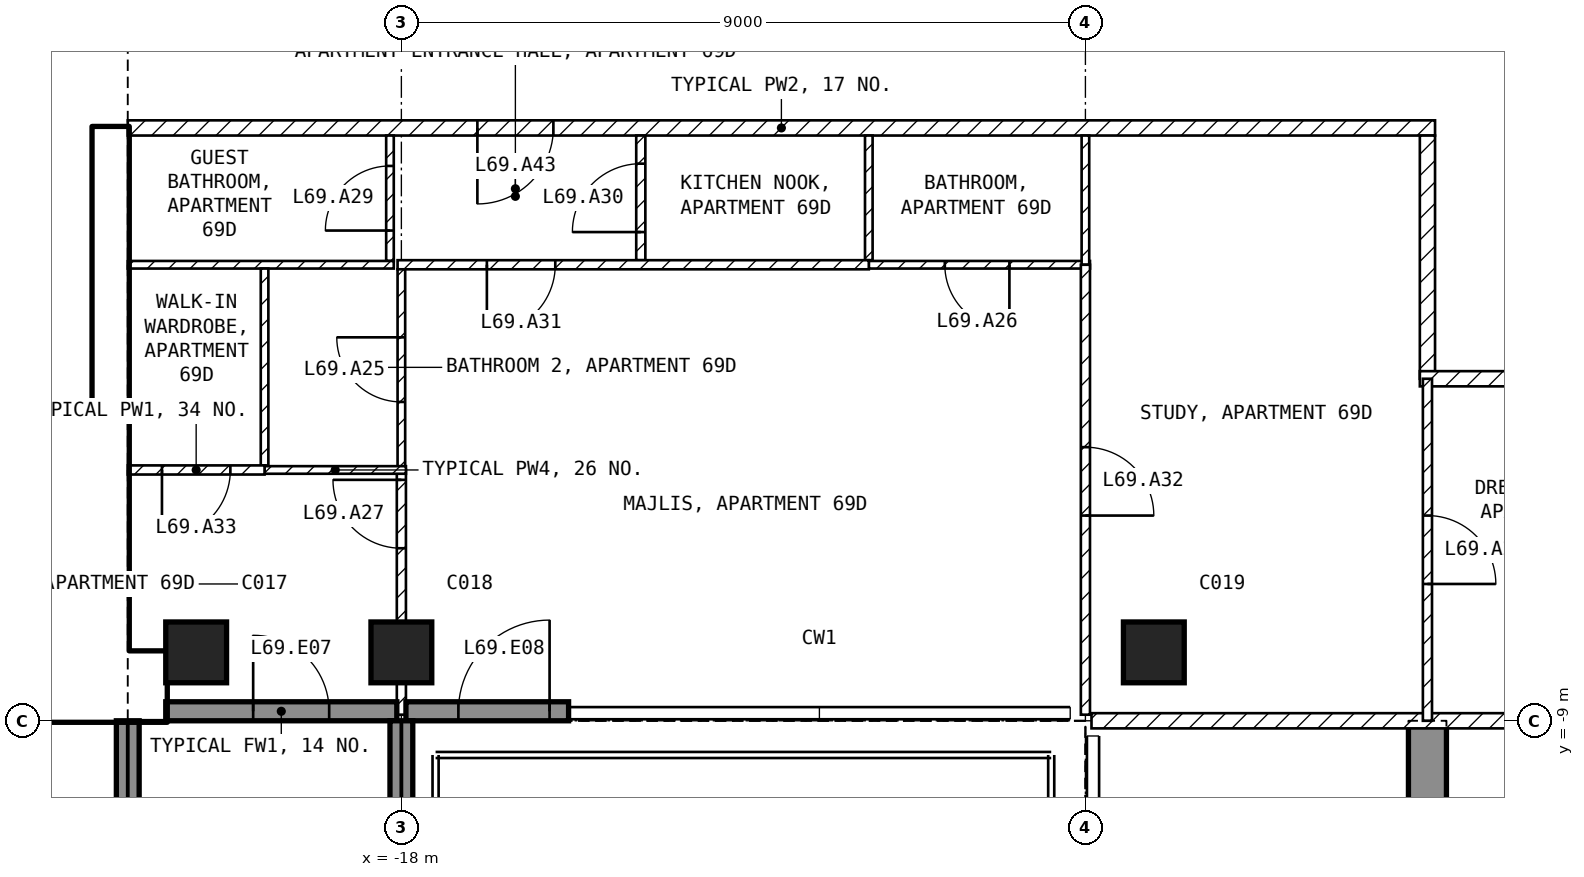
"""IFC4 building model, lengths in metres.
Left out: names, types, materials, properties, quantities, classifications, styles, units other than length and angle.
Written with IfcOpenShell. Run it as: python <this file> out.ifc"""

import sys

from ifc_helpers import new_model, si_unit, direction, frame, frame_2d, origin, origin_2d, place, context, subcontext, project, spatial, polyline, rectangle, outline, extrude, element, fill, save


model = new_model("IFC4")
c1 = context("Model", 3, precision=1e-05, world=origin(), true_north=direction((0.0, 1.0)))
c2 = subcontext(c1, "Body", "Model", "MODEL_VIEW")
j1 = project(units=[si_unit("LENGTHUNIT", "METRE"), si_unit("PLANEANGLEUNIT", "RADIAN")], contexts=[c1])
p1 = place(None, origin())
s1 = spatial("IfcSite", under=j1, at=p1, CompositionType="ELEMENT")
p2 = place(p1, origin())
s2 = spatial("IfcBuilding", under=s1, at=p2, CompositionType="ELEMENT")
p3 = place(p2, frame((0.0, 0.0, 271.0)))
s3 = spatial("IfcBuildingStorey", under=s2, at=p3, CompositionType="ELEMENT", Elevation=271.0)
for number, where, z_axis, x_axis in (
    (1, (-20.7, -8.1, -0.25), (0.0, 0.0, 1.0), (1.0, 0.0, 0.0)),
    (2, (-18.0, -8.1, -0.25), (0.0, 0.0, 1.0), (1.0, 0.0, 0.0)),
    (3, (-8.1, -8.1, -0.25), (0.0, 0.0, 1.0), (1.0, 0.0, 0.0)),
):
    element("IfcColumn", number, at=place(p3, frame(where, z_axis=z_axis, x_axis=x_axis)), inside=s3, PredefinedType="COLUMN", context=c2, shape_type="SweptSolid", body=[
        extrude(rectangle(XDim=0.8, YDim=0.8, at=origin_2d()), origin(), (0.0, 0.0, 1.0), 3.5),
    ])
p4 = place(p3, frame((-4.75, -16.7, -0.25), z_axis=(1.0, 0.0, 0.0), x_axis=(0.0, 1.0, 0.0)))
e4 = element("IfcWall", 4, at=p4, inside=s3, PredefinedType="SHEAR", context=c2, shape_type="SweptSolid", body=[
    extrude(outline(polyline([(0.0, 0.0), (3.2, 0.0), (3.2, 2.65), (5.6, 2.65), (5.6, 0.0), (7.7, 0.0), (7.7, 3.5), (0.0, 3.5), (0.0, 0.0)])), origin(), (0.0, 0.0, 1.0), 0.5),
])
p5 = place(p3, frame((-21.1, -8.875, 0.0), z_axis=(0.0, 0.0, 1.0), x_axis=(1.0, 0.0, 0.0)))
e5 = element("IfcWall", 5, at=p5, inside=s3, PredefinedType="SOLIDWALL", context=c2, shape_type="SweptSolid", body=[
    extrude(rectangle(XDim=3.04, YDim=0.25, at=frame_2d((1.52, 0.0))), origin(), (0.0, 0.0, 1.0), 3.25),
])
p6 = place(p5, frame((1.15, 0.0, 0.0)))
e6 = element("IfcOpeningElement", 6, at=p6, cuts=e5, PredefinedType="OPENING", context=c2, shape_type="SweptSolid", body=[
    extrude(rectangle(XDim=1.0, YDim=2.4, at=frame_2d((0.5, 1.2))), frame((0.0, 0.135, 0.0), z_axis=(0.0, -1.0, 0.0), x_axis=(1.0, 0.0, 0.0)), (0.0, 0.0, 1.0), 0.27),
])
p7 = place(p3, frame((-17.94, -8.875, 0.0), z_axis=(0.0, 0.0, 1.0), x_axis=(1.0, 0.0, 0.0)))
e7 = element("IfcWall", 7, at=p7, inside=s3, PredefinedType="SOLIDWALL", context=c2, shape_type="SweptSolid", body=[
    extrude(rectangle(XDim=2.14, YDim=0.25, at=frame_2d((1.07, 0.0))), origin(), (0.0, 0.0, 1.0), 3.25),
])
p8 = place(p7, frame((0.69, 0.0, 0.0)))
e8 = element("IfcOpeningElement", 8, at=p8, cuts=e7, PredefinedType="OPENING", context=c2, shape_type="SweptSolid", body=[
    extrude(rectangle(XDim=1.2, YDim=2.4, at=frame_2d((0.6, 1.2))), frame((0.0, 0.135, 0.0), z_axis=(0.0, -1.0, 0.0), x_axis=(1.0, 0.0, 0.0)), (0.0, 0.0, 1.0), 0.27),
])
p9 = place(p3, frame((-21.6, -9.0, 0.0), z_axis=(0.0, 0.0, 1.0), x_axis=(0.0, -1.0, 0.0)))
e9 = element("IfcWall", 9, at=p9, inside=s3, PredefinedType="SOLIDWALL", context=c2, shape_type="SweptSolid", body=[
    extrude(rectangle(XDim=2.7, YDim=0.3, at=frame_2d((1.35, 0.0))), origin(), (0.0, 0.0, 1.0), 3.25),
])
p10 = place(p3, frame((-18.0, -9.0, 0.0), z_axis=(0.0, 0.0, 1.0), x_axis=(0.0, -1.0, 0.0)))
e10 = element("IfcWall", 10, at=p10, inside=s3, PredefinedType="SOLIDWALL", context=c2, shape_type="SweptSolid", body=[
    extrude(rectangle(XDim=2.74, YDim=0.3, at=frame_2d((1.37, 0.0))), origin(), (0.0, 0.0, 1.0), 3.25),
])
p11 = place(p3, frame((-30.2, -8.55, 0.0), z_axis=(0.0, 0.0, 1.0), x_axis=(1.0, 0.0, 0.0)))
e11 = element("IfcWall", 11, at=p11, inside=s3, PredefinedType="SHEAR", context=c2, shape_type="SweptSolid", body=[
    extrude(rectangle(XDim=9.1, YDim=0.9, at=frame_2d((4.55, 0.0))), origin(), (0.0, 0.0, 1.0), 3.25),
])
p12 = place(p3, frame((-21.825, -8.1, 0.0), z_axis=(0.0, 0.0, 1.0), x_axis=(0.0, 1.0, 0.0)))
e12 = element("IfcWall", 12, at=p12, inside=s3, PredefinedType="SHEAR", context=c2, shape_type="SweptSolid", body=[
    extrude(rectangle(XDim=6.9, YDim=0.45, at=frame_2d((3.45, 0.0))), origin(), (0.0, 0.0, 1.0), 3.25),
])
p13 = place(p3, frame((-28.35, -5.15, 0.0), z_axis=(0.0, 0.0, 1.0), x_axis=(1.0, 0.0, 0.0)))
e13 = element("IfcWall", 13, at=p13, inside=s3, PredefinedType="SOLIDWALL", context=c2, shape_type="SweptSolid", body=[
    extrude(rectangle(XDim=6.3, YDim=0.2, at=frame_2d((3.15, 0.0))), origin(), (0.0, 0.0, 1.0), 3.25),
])
p14 = place(p13, frame((5.1, 0.0, 0.0)))
e14 = element("IfcOpeningElement", 14, at=p14, cuts=e13, PredefinedType="OPENING", context=c2, shape_type="SweptSolid", body=[
    extrude(rectangle(XDim=1.0, YDim=2.1, at=frame_2d((0.5, 1.05))), frame((0.0, 0.11, 0.0), z_axis=(0.0, -1.0, 0.0), x_axis=(1.0, 0.0, 0.0)), (0.0, 0.0, 1.0), 0.22),
])
p15 = place(p3, frame((-4.4, -1.2, 0.0), z_axis=(0.0, 0.0, 1.0), x_axis=(-1.0, 0.0, 0.0)))
e15 = element("IfcWall", 15, at=p15, inside=s3, PredefinedType="PARTITIONING", context=c2, shape_type="SweptSolid", body=[
    extrude(rectangle(XDim=17.2, YDim=0.2, at=frame_2d((8.6, 0.0))), origin(), (0.0, 0.0, 1.0), 3.25),
])
p16 = place(p15, frame((11.6, 0.0, 0.0)))
e16 = element("IfcOpeningElement", 16, at=p16, cuts=e15, PredefinedType="OPENING", context=c2, shape_type="SweptSolid", body=[
    extrude(rectangle(XDim=1.0, YDim=2.1, at=frame_2d((0.5, 1.05))), frame((0.0, 0.11, 0.0), z_axis=(0.0, -1.0, 0.0), x_axis=(1.0, 0.0, 0.0)), (0.0, 0.0, 1.0), 0.22),
])
p17 = place(p3, frame((-4.5, -4.5, 0.0), z_axis=(0.0, 0.0, 1.0), x_axis=(0.0, 1.0, 0.0)))
e17 = element("IfcWall", 17, at=p17, inside=s3, PredefinedType="PARTITIONING", context=c2, shape_type="SweptSolid", body=[
    extrude(rectangle(XDim=3.2, YDim=0.2, at=frame_2d((1.6, 0.0))), origin(), (0.0, 0.0, 1.0), 3.25),
])
p18 = place(p3, frame((-1.1, -4.5, 0.0), z_axis=(0.0, 0.0, 1.0), x_axis=(-1.0, 0.0, 0.0)))
e18 = element("IfcWall", 18, at=p18, inside=s3, PredefinedType="PARTITIONING", context=c2, shape_type="SweptSolid", body=[
    extrude(rectangle(XDim=3.5, YDim=0.2, at=frame_2d((1.75, 0.0))), origin(), (0.0, 0.0, 1.0), 3.25),
])
p19 = place(p3, frame((8.92, -9.0, 0.0), z_axis=(0.0, 0.0, 1.0), x_axis=(-1.0, 0.0, 0.0)))
e19 = element("IfcWall", 19, at=p19, inside=s3, PredefinedType="PARTITIONING", context=c2, shape_type="SweptSolid", body=[
    extrude(rectangle(XDim=17.84, YDim=0.2, at=frame_2d((8.92, 0.0))), origin(), (0.0, 0.0, 1.0), 3.25),
])
p20 = place(p19, frame((8.42, 0.0, 0.0)))
e20 = element("IfcOpeningElement", 20, at=p20, cuts=e19, PredefinedType="OPENING", context=c2, shape_type="SweptSolid", body=[
    extrude(rectangle(XDim=1.0, YDim=2.1, at=frame_2d((0.5, 1.05))), frame((0.0, 0.11, 0.0), z_axis=(0.0, -1.0, 0.0), x_axis=(1.0, 0.0, 0.0)), (0.0, 0.0, 1.0), 0.22),
])
p21 = place(p3, frame((-11.85, -2.94, 0.0), z_axis=(0.0, 0.0, 1.0), x_axis=(0.0, 1.0, 0.0)))
e21 = element("IfcWall", 21, at=p21, inside=s3, PredefinedType="PARTITIONING", context=c2, shape_type="SweptSolid", body=[
    extrude(rectangle(XDim=1.64, YDim=0.1, at=frame_2d((0.82, 0.0))), origin(), (0.0, 0.0, 1.0), 3.25),
])
p22 = place(p3, frame((-8.94, -3.0, 0.0), z_axis=(0.0, 0.0, 1.0), x_axis=(-1.0, 0.0, 0.0)))
e22 = element("IfcWall", 22, at=p22, inside=s3, PredefinedType="PARTITIONING", context=c2, shape_type="SweptSolid", body=[
    extrude(rectangle(XDim=2.91, YDim=0.1, at=frame_2d((1.455, 0.0))), origin(), (0.0, 0.0, 1.0), 3.25),
])
p23 = place(p22, frame((1.06, 0.0, 0.0)))
e23 = element("IfcOpeningElement", 23, at=p23, cuts=e22, PredefinedType="OPENING", context=c2, shape_type="SweptSolid", body=[
    extrude(rectangle(XDim=0.85, YDim=2.1, at=frame_2d((0.425, 1.05))), frame((0.0, 0.06, 0.0), z_axis=(0.0, -1.0, 0.0), x_axis=(1.0, 0.0, 0.0)), (0.0, 0.0, 1.0), 0.12),
])
p24 = place(p3, frame((-9.0, -1.3, 0.0), z_axis=(0.0, 0.0, 1.0), x_axis=(0.0, -1.0, 0.0)))
e24 = element("IfcWall", 24, at=p24, inside=s3, PredefinedType="PARTITIONING", context=c2, shape_type="SweptSolid", body=[
    extrude(rectangle(XDim=1.7, YDim=0.1, at=frame_2d((0.85, 0.0))), origin(), (0.0, 0.0, 1.0), 3.25),
])
p25 = place(p3, frame((-14.85, -2.94, 0.0), z_axis=(0.0, 0.0, 1.0), x_axis=(0.0, 1.0, 0.0)))
e25 = element("IfcWall", 25, at=p25, inside=s3, PredefinedType="PARTITIONING", context=c2, shape_type="SweptSolid", body=[
    extrude(rectangle(XDim=1.64, YDim=0.12, at=frame_2d((0.82, 0.0))), origin(), (0.0, 0.0, 1.0), 3.25),
])
p26 = place(p25, frame((0.37, 0.0, 0.0)))
e26 = element("IfcOpeningElement", 26, at=p26, cuts=e25, PredefinedType="OPENING", context=c2, shape_type="SweptSolid", body=[
    extrude(rectangle(XDim=0.9, YDim=2.1, at=frame_2d((0.45, 1.05))), frame((0.0, 0.07, 0.0), z_axis=(0.0, -1.0, 0.0), x_axis=(1.0, 0.0, 0.0)), (0.0, 0.0, 1.0), 0.14),
])
p27 = place(p3, frame((-11.85, -3.0, 0.0), z_axis=(0.0, 0.0, 1.0), x_axis=(-1.0, 0.0, 0.0)))
e27 = element("IfcWall", 27, at=p27, inside=s3, PredefinedType="PARTITIONING", context=c2, shape_type="SweptSolid", body=[
    extrude(rectangle(XDim=6.2, YDim=0.12, at=frame_2d((3.1, 0.0))), origin(), (0.0, 0.0, 1.0), 3.25),
])
p28 = place(p27, frame((4.125, 0.0, 0.0)))
e28 = element("IfcOpeningElement", 28, at=p28, cuts=e27, PredefinedType="OPENING", context=c2, shape_type="SweptSolid", body=[
    extrude(rectangle(XDim=0.9, YDim=2.1, at=frame_2d((0.45, 1.05))), frame((0.0, 0.07, 0.0), z_axis=(0.0, -1.0, 0.0), x_axis=(1.0, 0.0, 0.0)), (0.0, 0.0, 1.0), 0.14),
])
p29 = place(p3, frame((-18.15, -2.95, 0.0), z_axis=(0.0, 0.0, 1.0), x_axis=(0.0, 1.0, 0.0)))
e29 = element("IfcWall", 29, at=p29, inside=s3, PredefinedType="PARTITIONING", context=c2, shape_type="SweptSolid", body=[
    extrude(rectangle(XDim=1.65, YDim=0.1, at=frame_2d((0.825, 0.0))), origin(), (0.0, 0.0, 1.0), 2.496),
])
p30 = place(p29, frame((0.4, 0.0, 0.0)))
e30 = element("IfcOpeningElement", 30, at=p30, cuts=e29, PredefinedType="OPENING", context=c2, shape_type="SweptSolid", body=[
    extrude(rectangle(XDim=0.85, YDim=2.1, at=frame_2d((0.425, 1.05))), frame((0.0, 0.06, 0.0), z_axis=(0.0, -1.0, 0.0), x_axis=(1.0, 0.0, 0.0)), (0.0, 0.0, 1.0), 0.12),
])
p31 = place(p3, frame((-18.1, -3.0, 0.0), z_axis=(0.0, 0.0, 1.0), x_axis=(-1.0, 0.0, 0.0)))
e31 = element("IfcWall", 31, at=p31, inside=s3, PredefinedType="PARTITIONING", context=c2, shape_type="SweptSolid", body=[
    extrude(rectangle(XDim=3.5, YDim=0.1, at=frame_2d((1.75, 0.0))), origin(), (0.0, 0.0, 1.0), 3.25),
])
p32 = place(p3, frame((-18.0, -5.7, 0.0), z_axis=(0.0, 0.0, 1.0), x_axis=(0.0, 1.0, 0.0)))
e32 = element("IfcWall", 32, at=p32, inside=s3, PredefinedType="PARTITIONING", context=c2, shape_type="SweptSolid", body=[
    extrude(rectangle(XDim=2.64, YDim=0.1, at=frame_2d((1.32, 0.0))), origin(), (0.0, 0.0, 1.0), 2.496),
])
p33 = place(p32, frame((0.895, 0.0, 0.0)))
e33 = element("IfcOpeningElement", 33, at=p33, cuts=e32, PredefinedType="OPENING", context=c2, shape_type="SweptSolid", body=[
    extrude(rectangle(XDim=0.85, YDim=2.1, at=frame_2d((0.425, 1.05))), frame((0.0, 0.06, 0.0), z_axis=(0.0, -1.0, 0.0), x_axis=(1.0, 0.0, 0.0)), (0.0, 0.0, 1.0), 0.12),
])
p34 = place(p3, frame((-18.0, -8.92, 0.0), z_axis=(0.0, 0.0, 1.0), x_axis=(0.0, 1.0, 0.0)))
e34 = element("IfcWall", 34, at=p34, inside=s3, PredefinedType="PARTITIONING", context=c2, shape_type="SweptSolid", body=[
    extrude(rectangle(XDim=3.22, YDim=0.12, at=frame_2d((1.61, 0.0))), origin(), (0.0, 0.0, 1.0), 2.496),
])
p35 = place(p34, frame((2.19, 0.0, 0.0)))
e35 = element("IfcOpeningElement", 35, at=p35, cuts=e34, PredefinedType="OPENING", context=c2, shape_type="SweptSolid", body=[
    extrude(rectangle(XDim=0.9, YDim=2.1, at=frame_2d((0.45, 1.05))), frame((0.0, 0.07, 0.0), z_axis=(0.0, -1.0, 0.0), x_axis=(1.0, 0.0, 0.0)), (0.0, 0.0, 1.0), 0.14),
])
p36 = place(p3, frame((-9.0, -3.0, 0.0), z_axis=(0.0, 0.0, 1.0), x_axis=(0.0, -1.0, 0.0)))
e36 = element("IfcWall", 36, at=p36, inside=s3, PredefinedType="PARTITIONING", context=c2, shape_type="SweptSolid", body=[
    extrude(rectangle(XDim=5.92, YDim=0.12, at=frame_2d((2.96, 0.0))), origin(), (0.0, 0.0, 1.0), 3.25),
])
p37 = place(p36, frame((2.4, 0.0, 0.0)))
e37 = element("IfcOpeningElement", 37, at=p37, cuts=e36, PredefinedType="OPENING", context=c2, shape_type="SweptSolid", body=[
    extrude(rectangle(XDim=0.9, YDim=2.1, at=frame_2d((0.45, 1.05))), frame((0.0, 0.07, 0.0), z_axis=(0.0, -1.0, 0.0), x_axis=(1.0, 0.0, 0.0)), (0.0, 0.0, 1.0), 0.14),
])
p38 = place(p3, frame((-19.8, -5.64, 0.0), z_axis=(0.0, 0.0, 1.0), x_axis=(0.0, 1.0, 0.0)))
e38 = element("IfcWall", 38, at=p38, inside=s3, PredefinedType="PARTITIONING", context=c2, shape_type="SweptSolid", body=[
    extrude(rectangle(XDim=2.59, YDim=0.1, at=frame_2d((1.295, 0.0))), origin(), (0.0, 0.0, 1.0), 3.25),
])
p39 = place(p3, frame((-17.94, -5.7, 0.0), z_axis=(0.0, 0.0, 1.0), x_axis=(-1.0, 0.0, 0.0)))
e39 = element("IfcWall", 39, at=p39, inside=s3, PredefinedType="PARTITIONING", context=c2, shape_type="SweptSolid", body=[
    extrude(rectangle(XDim=1.86, YDim=0.1, at=frame_2d((0.93, 0.0))), origin(), (0.0, 0.0, 1.0), 3.25),
])
p40 = place(p3, frame((-19.8, -5.7, 0.0), z_axis=(0.0, 0.0, 1.0), x_axis=(-1.0, 0.0, 0.0)))
e40 = element("IfcWall", 40, at=p40, inside=s3, PredefinedType="PARTITIONING", context=c2, shape_type="SweptSolid", body=[
    extrude(rectangle(XDim=1.8, YDim=0.12, at=frame_2d((0.9, 0.0))), origin(), (0.0, 0.0, 1.0), 3.25),
])
p41 = place(p40, frame((0.45, 0.0, 0.0)))
e41 = element("IfcOpeningElement", 41, at=p41, cuts=e40, PredefinedType="OPENING", context=c2, shape_type="SweptSolid", body=[
    extrude(rectangle(XDim=0.9, YDim=2.1, at=frame_2d((0.45, 1.05))), frame((0.0, 0.07, 0.0), z_axis=(0.0, -1.0, 0.0), x_axis=(1.0, 0.0, 0.0)), (0.0, 0.0, 1.0), 0.14),
])
p42 = place(p3, frame((-4.5, -4.5, 0.0), z_axis=(0.0, 0.0, 1.0), x_axis=(0.0, -1.0, 0.0)))
e42 = element("IfcWall", 42, at=p42, inside=s3, PredefinedType="PARTITIONING", context=c2, shape_type="SweptSolid", body=[
    extrude(rectangle(XDim=4.5, YDim=0.12, at=frame_2d((2.25, 0.0))), origin(), (0.0, 0.0, 1.0), 3.25),
])
p43 = place(p42, frame((1.8, 0.0, 0.0)))
e43 = element("IfcOpeningElement", 43, at=p43, cuts=e42, PredefinedType="OPENING", context=c2, shape_type="SweptSolid", body=[
    extrude(rectangle(XDim=0.9, YDim=2.1, at=frame_2d((0.45, 1.05))), frame((0.0, 0.07, 0.0), z_axis=(0.0, -1.0, 0.0), x_axis=(1.0, 0.0, 0.0)), (0.0, 0.0, 1.0), 0.14),
])
p44 = place(p6, origin())
e44 = element("IfcDoor", 44, at=p44, inside=s3, OperationType="SINGLE_SWING_LEFT", PredefinedType="DOOR", context=c2, shape_type="SweptSolid", body=[
    extrude(rectangle(XDim=1.0, YDim=2.4, at=frame_2d((0.5, 1.2))), frame((0.0, 0.025, 0.0), z_axis=(0.0, -1.0, 0.0), x_axis=(1.0, 0.0, 0.0)), (0.0, 0.0, 1.0), 0.05),
])
fill(e6, e44)
p45 = place(p8, origin())
e45 = element("IfcDoor", 45, at=p45, inside=s3, OperationType="SINGLE_SWING_RIGHT", PredefinedType="DOOR", context=c2, shape_type="SweptSolid", body=[
    extrude(rectangle(XDim=1.2, YDim=2.4, at=frame_2d((0.6, 1.2))), frame((0.0, 0.025, 0.0), z_axis=(0.0, -1.0, 0.0), x_axis=(1.0, 0.0, 0.0)), (0.0, 0.0, 1.0), 0.05),
])
fill(e8, e45)
p46 = place(p14, origin())
e46 = element("IfcDoor", 46, at=p46, inside=s3, OperationType="SINGLE_SWING_LEFT", PredefinedType="DOOR", context=c2, shape_type="SweptSolid", body=[
    extrude(rectangle(XDim=1.0, YDim=2.1, at=frame_2d((0.5, 1.05))), frame((0.0, 0.025, 0.0), z_axis=(0.0, -1.0, 0.0), x_axis=(1.0, 0.0, 0.0)), (0.0, 0.0, 1.0), 0.05),
])
fill(e14, e46)
p47 = place(p33, origin())
e47 = element("IfcDoor", 47, at=p47, inside=s3, OperationType="SINGLE_SWING_RIGHT", PredefinedType="DOOR", context=c2, shape_type="SweptSolid", body=[
    extrude(rectangle(XDim=0.85, YDim=2.1, at=frame_2d((0.425, 1.05))), frame((0.0, 0.025, 0.0), z_axis=(0.0, -1.0, 0.0), x_axis=(1.0, 0.0, 0.0)), (0.0, 0.0, 1.0), 0.05),
])
fill(e33, e47)
p48 = place(p23, origin())
e48 = element("IfcDoor", 48, at=p48, inside=s3, OperationType="SINGLE_SWING_LEFT", PredefinedType="DOOR", context=c2, shape_type="SweptSolid", body=[
    extrude(rectangle(XDim=0.85, YDim=2.1, at=frame_2d((0.425, 1.05))), frame((0.0, 0.025, 0.0), z_axis=(0.0, -1.0, 0.0), x_axis=(1.0, 0.0, 0.0)), (0.0, 0.0, 1.0), 0.05),
])
fill(e23, e48)
p49 = place(p35, origin())
e49 = element("IfcDoor", 49, at=p49, inside=s3, OperationType="SINGLE_SWING_RIGHT", PredefinedType="DOOR", context=c2, shape_type="SweptSolid", body=[
    extrude(rectangle(XDim=0.9, YDim=2.1, at=frame_2d((0.45, 1.05))), frame((0.0, 0.025, 0.0), z_axis=(0.0, -1.0, 0.0), x_axis=(1.0, 0.0, 0.0)), (0.0, 0.0, 1.0), 0.05),
])
fill(e35, e49)
p50 = place(p43, origin())
e50 = element("IfcDoor", 50, at=p50, inside=s3, OperationType="SINGLE_SWING_RIGHT", PredefinedType="DOOR", context=c2, shape_type="SweptSolid", body=[
    extrude(rectangle(XDim=0.9, YDim=2.1, at=frame_2d((0.45, 1.05))), frame((0.0, 0.025, 0.0), z_axis=(0.0, -1.0, 0.0), x_axis=(1.0, 0.0, 0.0)), (0.0, 0.0, 1.0), 0.05),
])
fill(e43, e50)
p51 = place(p30, origin())
e51 = element("IfcDoor", 51, at=p51, inside=s3, OperationType="SINGLE_SWING_LEFT", PredefinedType="DOOR", context=c2, shape_type="SweptSolid", body=[
    extrude(rectangle(XDim=0.85, YDim=2.1, at=frame_2d((0.425, 1.05))), frame((0.0, 0.025, 0.0), z_axis=(0.0, -1.0, 0.0), x_axis=(1.0, 0.0, 0.0)), (0.0, 0.0, 1.0), 0.05),
])
fill(e30, e51)
p52 = place(p26, origin())
e52 = element("IfcDoor", 52, at=p52, inside=s3, OperationType="SINGLE_SWING_LEFT", PredefinedType="DOOR", context=c2, shape_type="SweptSolid", body=[
    extrude(rectangle(XDim=0.9, YDim=2.1, at=frame_2d((0.45, 1.05))), frame((0.0, 0.025, 0.0), z_axis=(0.0, -1.0, 0.0), x_axis=(1.0, 0.0, 0.0)), (0.0, 0.0, 1.0), 0.05),
])
fill(e26, e52)
p53 = place(p28, origin())
e53 = element("IfcDoor", 53, at=p53, inside=s3, OperationType="SINGLE_SWING_RIGHT", PredefinedType="DOOR", context=c2, shape_type="SweptSolid", body=[
    extrude(rectangle(XDim=0.9, YDim=2.1, at=frame_2d((0.45, 1.05))), frame((0.0, 0.025, 0.0), z_axis=(0.0, -1.0, 0.0), x_axis=(1.0, 0.0, 0.0)), (0.0, 0.0, 1.0), 0.05),
])
fill(e28, e53)
p54 = place(p37, origin())
e54 = element("IfcDoor", 54, at=p54, inside=s3, OperationType="SINGLE_SWING_RIGHT", PredefinedType="DOOR", context=c2, shape_type="SweptSolid", body=[
    extrude(rectangle(XDim=0.9, YDim=2.1, at=frame_2d((0.45, 1.05))), frame((0.0, 0.025, 0.0), z_axis=(0.0, -1.0, 0.0), x_axis=(1.0, 0.0, 0.0)), (0.0, 0.0, 1.0), 0.05),
])
fill(e37, e54)
p55 = place(p41, origin())
e55 = element("IfcDoor", 55, at=p55, inside=s3, OperationType="SINGLE_SWING_RIGHT", PredefinedType="DOOR", context=c2, shape_type="SweptSolid", body=[
    extrude(rectangle(XDim=0.9, YDim=2.1, at=frame_2d((0.45, 1.05))), frame((0.0, 0.025, 0.0), z_axis=(0.0, -1.0, 0.0), x_axis=(1.0, 0.0, 0.0)), (0.0, 0.0, 1.0), 0.05),
])
fill(e41, e55)
p56 = place(p16, origin())
e56 = element("IfcDoor", 56, at=p56, inside=s3, OperationType="SINGLE_SWING_RIGHT", PredefinedType="DOOR", context=c2, shape_type="SweptSolid", body=[
    extrude(rectangle(XDim=1.0, YDim=2.1, at=frame_2d((0.5, 1.05))), frame((0.0, 0.025, 0.0), z_axis=(0.0, -1.0, 0.0), x_axis=(1.0, 0.0, 0.0)), (0.0, 0.0, 1.0), 0.05),
])
fill(e16, e56)
save(model, sys.argv[1])
